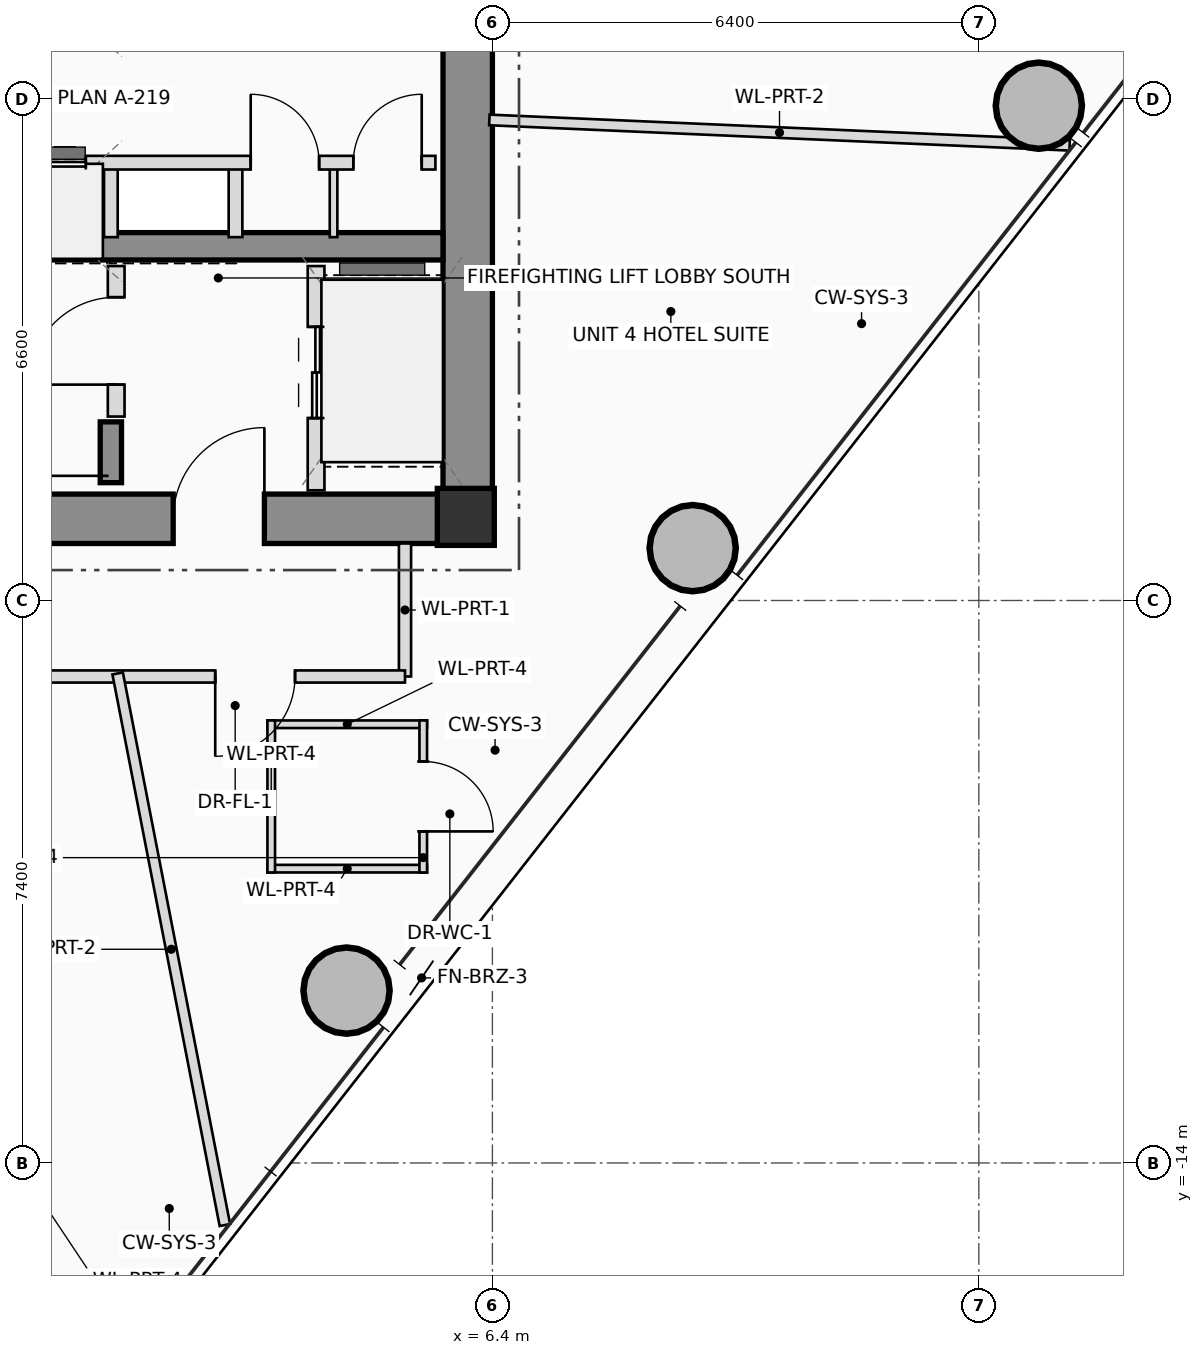
"""IFC4 building model, lengths in metres.
Left out: names, types, materials, properties, quantities, classifications, styles, units other than length and angle.
Written with IfcOpenShell. Run it as: python <this file> out.ifc"""

import sys

from ifc_helpers import new_model, si_unit, direction, frame, frame_2d, origin, origin_2d, place, context, subcontext, project, spatial, rectangle, hollow_circle, extrude, source, transform, mapped, element, fill, save


model = new_model("IFC4")
c1 = context("Model", 3, precision=1e-05, world=origin(), true_north=direction((0.0, 1.0)))
c2 = subcontext(c1, "Body", "Model", "MODEL_VIEW")
j1 = project(units=[si_unit("LENGTHUNIT", "METRE"), si_unit("PLANEANGLEUNIT", "RADIAN")], contexts=[c1])
p1 = place(None, origin())
s1 = spatial("IfcSite", under=j1, at=p1, CompositionType="ELEMENT")
p2 = place(p1, origin())
s2 = spatial("IfcBuilding", under=s1, at=p2, CompositionType="ELEMENT")
p3 = place(p2, frame((0.0, 0.0, 212.15)))
s3 = spatial("IfcBuildingStorey", under=s2, at=p3, CompositionType="ELEMENT", Elevation=212.15)
m1 = source(origin(), c2, "Body", "SweptSolid", [
    extrude(rectangle(XDim=0.75, YDim=0.75, at=origin_2d()), origin(), (0.0, 0.0, 1.0), 3.45),
])
p4 = place(p3, frame((6.05, -5.5, 0.0), z_axis=(0.0, 0.0, 1.0), x_axis=(1.0, 0.0, 0.0)))
e1 = element("IfcColumn", 1, at=p4, inside=s3, PredefinedType="COLUMN", context=c2, shape_type="MappedRepresentation", body=[
    mapped(m1, transform((0.0, 0.0, 0.0), scale=1.0)),
])
p5 = place(p3, frame((-6.4, -5.525, 0.0), z_axis=(0.0, 0.0, 1.0), x_axis=(1.0, 0.0, 0.0)))
e2 = element("IfcWall", 2, at=p5, inside=s3, PredefinedType="SHEAR", context=c2, shape_type="SweptSolid", body=[
    extrude(rectangle(XDim=12.8, YDim=0.65, at=frame_2d((6.4, 0.0))), origin(), (0.0, 0.0, 1.0), 3.45),
])
p6 = place(p5, frame((8.6, 0.0, 0.0)))
e3 = element("IfcOpeningElement", 3, at=p6, cuts=e2, PredefinedType="OPENING", context=c2, shape_type="SweptSolid", body=[
    extrude(rectangle(XDim=1.2, YDim=2.2, at=frame_2d((0.6, 1.1))), frame((0.0, 0.335, 0.0), z_axis=(0.0, -1.0, 0.0), x_axis=(1.0, 0.0, 0.0)), (0.0, 0.0, 1.0), 0.67),
])
p7 = place(p3, frame((6.075, -5.2, 0.0), z_axis=(0.0, 0.0, 1.0), x_axis=(0.0, 1.0, 0.0)))
e4 = element("IfcWall", 4, at=p7, inside=s3, PredefinedType="SHEAR", context=c2, shape_type="SweptSolid", body=[
    extrude(rectangle(XDim=10.4, YDim=0.65, at=frame_2d((5.2, 0.0))), origin(), (0.0, 0.0, 1.0), 3.45),
])
p8 = place(p3, frame((-5.75, -1.94, 0.0), z_axis=(0.0, 0.0, 1.0), x_axis=(1.0, 0.0, 0.0)))
e5 = element("IfcWall", 5, at=p8, inside=s3, PredefinedType="SHEAR", context=c2, shape_type="SweptSolid", body=[
    extrude(rectangle(XDim=11.5, YDim=0.36, at=frame_2d((5.75, 0.0))), origin(), (0.0, 0.0, 1.0), 3.45),
])
p9 = place(p3, frame((1.38, -5.05, 0.0), z_axis=(0.0, 0.0, 1.0), x_axis=(0.0, 1.0, 0.0)))
e6 = element("IfcWall", 6, at=p9, inside=s3, PredefinedType="SHEAR", context=c2, shape_type="SweptSolid", body=[
    extrude(rectangle(XDim=0.8, YDim=0.28, at=frame_2d((0.4, 0.0))), origin(), (0.0, 0.0, 1.0), 3.45),
])
m2 = source(origin(), c2, "Body", "SweptSolid", [
    extrude(hollow_circle(Radius=0.575, WallThickness=0.042, at=origin_2d()), origin(), (0.0, 0.0, 1.0), 3.45),
])
for number, where, z_axis, x_axis in (
    (7, (4.481, -11.732, 0.0), (0.0, 0.0, 1.0), (1.0, 0.0, 0.0)),
    (8, (9.035, -5.911, 0.0), (0.0, 0.0, 1.0), (1.0, 0.0, 0.0)),
    (9, (13.59, -0.09, 0.0), (0.0, 0.0, 1.0), (1.0, 0.0, 0.0)),
):
    element("IfcColumn", number, at=place(p3, frame(where, z_axis=z_axis, x_axis=x_axis)), inside=s3, PredefinedType="COLUMN", context=c2, shape_type="MappedRepresentation", body=[
        mapped(m2, transform((0.0, 0.0, 0.0), scale=1.0)),
    ])
p10 = place(p3, frame((1.45, -4.18, 0.0), z_axis=(0.0, 0.0, 1.0), x_axis=(0.0, 1.0, 0.0)))
e10 = element("IfcWall", 10, at=p10, inside=s3, PredefinedType="PLUMBINGWALL", context=c2, shape_type="SweptSolid", body=[
    extrude(rectangle(XDim=1.98, YDim=0.22, at=frame_2d((0.99, 0.0))), origin(), (0.0, 0.0, 1.0), 3.25),
])
p11 = place(p10, frame((0.42, 0.0, 0.0)))
e11 = element("IfcOpeningElement", 11, at=p11, cuts=e10, PredefinedType="OPENING", context=c2, shape_type="SweptSolid", body=[
    extrude(rectangle(XDim=1.15, YDim=2.15, at=frame_2d((0.575, 1.075))), frame((0.0, 0.12, 0.0), z_axis=(0.0, -1.0, 0.0), x_axis=(1.0, 0.0, 0.0)), (0.0, 0.0, 1.0), 0.24),
])
p12 = place(p3, frame((4.08, -5.15, 0.0), z_axis=(0.0, 0.0, 1.0), x_axis=(0.0, 1.0, 0.0)))
e12 = element("IfcWall", 12, at=p12, inside=s3, PredefinedType="PLUMBINGWALL", context=c2, shape_type="SweptSolid", body=[
    extrude(rectangle(XDim=2.95, YDim=0.22, at=frame_2d((1.475, 0.0))), origin(), (0.0, 0.0, 1.0), 3.25),
])
p13 = place(p12, frame((0.95, 0.0, 0.0)))
e13 = element("IfcOpeningElement", 13, at=p13, cuts=e12, PredefinedType="OPENING", context=c2, shape_type="SweptSolid", body=[
    extrude(rectangle(XDim=1.2, YDim=2.25, at=frame_2d((0.6, 1.125))), frame((0.0, 0.12, 0.0), z_axis=(0.0, -1.0, 0.0), x_axis=(1.0, 0.0, 0.0)), (0.0, 0.0, 1.0), 0.24),
])
for number, where, z_axis, x_axis in (
    (14, (1.38, -1.82, 0.0), (0.0, 0.0, 1.0), (0.0, 1.0, 0.0)),
    (15, (3.02, -1.82, 0.0), (0.0, 0.0, 1.0), (0.0, 1.0, 0.0)),
):
    element("IfcWall", number, at=place(p3, frame(where, z_axis=z_axis, x_axis=x_axis)), inside=s3, PredefinedType="PLUMBINGWALL", context=c2, shape_type="SweptSolid", body=[
        extrude(rectangle(XDim=0.98, YDim=0.18, at=frame_2d((0.49, 0.0))), origin(), (0.0, 0.0, 1.0), 3.25),
    ])
p14 = place(p3, frame((4.31, -1.82, 0.0), z_axis=(0.0, 0.0, 1.0), x_axis=(0.0, 1.0, 0.0)))
e16 = element("IfcWall", 16, at=p14, inside=s3, PredefinedType="PARTITIONING", context=c2, shape_type="SweptSolid", body=[
    extrude(rectangle(XDim=0.98, YDim=0.1, at=frame_2d((0.49, 0.0))), origin(), (0.0, 0.0, 1.0), 3.25),
])
p15 = place(p3, frame((-5.68, -0.84, 0.0), z_axis=(0.0, 0.0, 1.0), x_axis=(1.0, 0.0, 0.0)))
e17 = element("IfcWall", 17, at=p15, inside=s3, PredefinedType="PLUMBINGWALL", context=c2, shape_type="SweptSolid", body=[
    extrude(rectangle(XDim=11.33, YDim=0.18, at=frame_2d((5.665, 0.0))), origin(), (0.0, 0.0, 1.0), 3.25),
])
p16 = place(p15, frame((1.18, 0.0, 0.0)))
e18 = element("IfcOpeningElement", 18, at=p16, cuts=e17, PredefinedType="OPENING", context=c2, shape_type="SweptSolid", body=[
    extrude(rectangle(XDim=0.9, YDim=2.05, at=frame_2d((0.45, 1.025))), frame((0.0, 0.1, 0.0), z_axis=(0.0, -1.0, 0.0), x_axis=(1.0, 0.0, 0.0)), (0.0, 0.0, 1.0), 0.2),
])
p17 = place(p15, frame((3.93, 0.0, 0.0)))
e19 = element("IfcOpeningElement", 19, at=p17, cuts=e17, PredefinedType="OPENING", context=c2, shape_type="SweptSolid", body=[
    extrude(rectangle(XDim=1.1, YDim=2.2, at=frame_2d((0.55, 1.1))), frame((0.0, 0.1, 0.0), z_axis=(0.0, -1.0, 0.0), x_axis=(1.0, 0.0, 0.0)), (0.0, 0.0, 1.0), 0.2),
])
p18 = place(p15, frame((5.63, 0.0, 0.0)))
e20 = element("IfcOpeningElement", 20, at=p18, cuts=e17, PredefinedType="OPENING", context=c2, shape_type="SweptSolid", body=[
    extrude(rectangle(XDim=1.1, YDim=2.2, at=frame_2d((0.55, 1.1))), frame((0.0, 0.1, 0.0), z_axis=(0.0, -1.0, 0.0), x_axis=(1.0, 0.0, 0.0)), (0.0, 0.0, 1.0), 0.2),
])
p19 = place(p15, frame((8.9, 0.0, 0.0)))
e21 = element("IfcOpeningElement", 21, at=p19, cuts=e17, PredefinedType="OPENING", context=c2, shape_type="SweptSolid", body=[
    extrude(rectangle(XDim=0.9, YDim=2.05, at=frame_2d((0.45, 1.025))), frame((0.0, 0.1, 0.0), z_axis=(0.0, -1.0, 0.0), x_axis=(1.0, 0.0, 0.0)), (0.0, 0.0, 1.0), 0.2),
])
p20 = place(p15, frame((10.25, 0.0, 0.0)))
e22 = element("IfcOpeningElement", 22, at=p20, cuts=e17, PredefinedType="OPENING", context=c2, shape_type="SweptSolid", body=[
    extrude(rectangle(XDim=0.9, YDim=2.05, at=frame_2d((0.45, 1.025))), frame((0.0, 0.1, 0.0), z_axis=(0.0, -1.0, 0.0), x_axis=(1.0, 0.0, 0.0)), (0.0, 0.0, 1.0), 0.2),
])
for number, where, z_axis, x_axis in (
    (23, (3.44, -8.228, 0.0), (0.0, 0.0, 1.0), (1.0, 0.0, 0.0)),
    (24, (5.54, -10.128, 0.0), (0.0, 0.0, 1.0), (-1.0, 0.0, 0.0)),
):
    element("IfcWall", number, at=place(p3, frame(where, z_axis=z_axis, x_axis=x_axis)), inside=s3, PredefinedType="PARTITIONING", context=c2, shape_type="SweptSolid", body=[
        extrude(rectangle(XDim=2.1, YDim=0.1, at=frame_2d((1.05, 0.0))), origin(), (0.0, 0.0, 1.0), 2.605),
    ])
p21 = place(p3, frame((5.49, -8.178, 0.0), z_axis=(0.0, 0.0, 1.0), x_axis=(0.0, -1.0, 0.0)))
e25 = element("IfcWall", 25, at=p21, inside=s3, PredefinedType="PARTITIONING", context=c2, shape_type="SweptSolid", body=[
    extrude(rectangle(XDim=2.0, YDim=0.1, at=frame_2d((1.0, 0.0))), origin(), (0.0, 0.0, 1.0), 2.605),
])
p22 = place(p21, frame((0.54, 0.0, 0.0)))
e26 = element("IfcOpeningElement", 26, at=p22, cuts=e25, PredefinedType="OPENING", context=c2, shape_type="SweptSolid", body=[
    extrude(rectangle(XDim=0.92, YDim=2.1, at=frame_2d((0.46, 1.05))), frame((0.0, 0.06, 0.0), z_axis=(0.0, -1.0, 0.0), x_axis=(1.0, 0.0, 0.0)), (0.0, 0.0, 1.0), 0.12),
])
p23 = place(p3, frame((3.49, -10.178, 0.0), z_axis=(0.0, 0.0, 1.0), x_axis=(0.0, 1.0, 0.0)))
e27 = element("IfcWall", 27, at=p23, inside=s3, PredefinedType="PARTITIONING", context=c2, shape_type="SweptSolid", body=[
    extrude(rectangle(XDim=2.0, YDim=0.1, at=frame_2d((1.0, 0.0))), origin(), (0.0, 0.0, 1.0), 2.805),
])
p24 = place(p3, frame((5.25, -5.85, 0.0), z_axis=(0.0, 0.0, 1.0), x_axis=(0.0, -1.0, 0.0)))
e28 = element("IfcWall", 28, at=p24, inside=s3, PredefinedType="PARTITIONING", context=c2, shape_type="SweptSolid", body=[
    extrude(rectangle(XDim=1.75, YDim=0.16, at=frame_2d((0.875, 0.0))), origin(), (0.0, 0.0, 1.0), 3.25),
])
p25 = place(p3, frame((5.25, -7.6, 0.0), z_axis=(0.0, 0.0, 1.0), x_axis=(-1.0, 0.0, 0.0)))
e29 = element("IfcWall", 29, at=p25, inside=s3, PredefinedType="PARTITIONING", context=c2, shape_type="SweptSolid", body=[
    extrude(rectangle(XDim=11.61, YDim=0.16, at=frame_2d((5.805, 0.0))), origin(), (0.0, 0.0, 1.0), 2.605),
])
p26 = place(p25, frame((1.447, 0.0, 0.0)))
e30 = element("IfcOpeningElement", 30, at=p26, cuts=e29, PredefinedType="OPENING", context=c2, shape_type="SweptSolid", body=[
    extrude(rectangle(XDim=1.05, YDim=2.2, at=frame_2d((0.525, 1.1))), frame((0.0, 0.09, 0.0), z_axis=(0.0, -1.0, 0.0), x_axis=(1.0, 0.0, 0.0)), (0.0, 0.0, 1.0), 0.18),
])
p27 = place(p25, frame((4.912, 0.0, 0.0)))
e31 = element("IfcOpeningElement", 31, at=p27, cuts=e29, PredefinedType="OPENING", context=c2, shape_type="SweptSolid", body=[
    extrude(rectangle(XDim=1.05, YDim=2.2, at=frame_2d((0.525, 1.1))), frame((0.0, 0.09, 0.0), z_axis=(0.0, -1.0, 0.0), x_axis=(1.0, 0.0, 0.0)), (0.0, 0.0, 1.0), 0.18),
])
p28 = place(p3, frame((6.36, -0.278, 0.0), z_axis=(0.0, 0.0, 1.0), x_axis=(0.999047276506, -0.04364102778, 0.0)))
e32 = element("IfcWall", 32, at=p28, inside=s3, PredefinedType="PARTITIONING", context=c2, shape_type="SweptSolid", body=[
    extrude(rectangle(XDim=7.642, YDim=0.14, at=frame_2d((3.821, 0.0))), origin(), (0.0, 0.0, 1.0), 2.605),
])
p29 = place(p3, frame((1.469, -7.56, 0.0), z_axis=(0.0, 0.0, 1.0), x_axis=(0.190822808967, -0.981624498257, 0.0)))
e33 = element("IfcWall", 33, at=p29, inside=s3, PredefinedType="PARTITIONING", context=c2, shape_type="SweptSolid", body=[
    extrude(rectangle(XDim=7.392, YDim=0.14, at=frame_2d((3.696, 0.0))), origin(), (0.0, 0.0, 1.0), 2.765),
])
p30 = place(p6, origin())
e34 = element("IfcDoor", 34, at=p30, inside=s3, OperationType="SINGLE_SWING_RIGHT", PredefinedType="DOOR", context=c2, shape_type="SweptSolid", body=[
    extrude(rectangle(XDim=1.2, YDim=2.2, at=frame_2d((0.6, 1.1))), frame((0.0, 0.025, 0.0), z_axis=(0.0, -1.0, 0.0), x_axis=(1.0, 0.0, 0.0)), (0.0, 0.0, 1.0), 0.05),
])
fill(e3, e34)
p31 = place(p11, origin())
e35 = element("IfcDoor", 35, at=p31, inside=s3, OperationType="SINGLE_SWING_LEFT", PredefinedType="DOOR", context=c2, shape_type="SweptSolid", body=[
    extrude(rectangle(XDim=1.15, YDim=2.15, at=frame_2d((0.575, 1.075))), frame((0.0, 0.025, 0.0), z_axis=(0.0, -1.0, 0.0), x_axis=(1.0, 0.0, 0.0)), (0.0, 0.0, 1.0), 0.05),
])
fill(e11, e35)
p32 = place(p13, origin())
e36 = element("IfcDoor", 36, at=p32, inside=s3, OperationType="DOUBLE_DOOR_SLIDING", PredefinedType="DOOR", context=c2, shape_type="SweptSolid", body=[
    extrude(rectangle(XDim=1.2, YDim=2.25, at=frame_2d((0.6, 1.125))), frame((0.0, 0.025, 0.0), z_axis=(0.0, -1.0, 0.0), x_axis=(1.0, 0.0, 0.0)), (0.0, 0.0, 1.0), 0.05),
])
fill(e13, e36)
p33 = place(p18, origin())
e37 = element("IfcDoor", 37, at=p33, inside=s3, OperationType="DOUBLE_DOOR_SLIDING", PredefinedType="DOOR", context=c2, shape_type="SweptSolid", body=[
    extrude(rectangle(XDim=1.1, YDim=2.2, at=frame_2d((0.55, 1.1))), frame((0.0, 0.025, 0.0), z_axis=(0.0, -1.0, 0.0), x_axis=(1.0, 0.0, 0.0)), (0.0, 0.0, 1.0), 0.05),
])
fill(e20, e37)
p34 = place(p19, origin())
e38 = element("IfcDoor", 38, at=p34, inside=s3, OperationType="SINGLE_SWING_LEFT", PredefinedType="DOOR", context=c2, shape_type="SweptSolid", body=[
    extrude(rectangle(XDim=0.9, YDim=2.05, at=frame_2d((0.45, 1.025))), frame((0.0, 0.025, 0.0), z_axis=(0.0, -1.0, 0.0), x_axis=(1.0, 0.0, 0.0)), (0.0, 0.0, 1.0), 0.05),
])
fill(e21, e38)
p35 = place(p20, origin())
e39 = element("IfcDoor", 39, at=p35, inside=s3, OperationType="SINGLE_SWING_RIGHT", PredefinedType="DOOR", context=c2, shape_type="SweptSolid", body=[
    extrude(rectangle(XDim=0.9, YDim=2.05, at=frame_2d((0.45, 1.025))), frame((0.0, 0.025, 0.0), z_axis=(0.0, -1.0, 0.0), x_axis=(1.0, 0.0, 0.0)), (0.0, 0.0, 1.0), 0.05),
])
fill(e22, e39)
p36 = place(p22, origin())
e40 = element("IfcDoor", 40, at=p36, inside=s3, OperationType="SINGLE_SWING_RIGHT", PredefinedType="DOOR", context=c2, shape_type="SweptSolid", body=[
    extrude(rectangle(XDim=0.92, YDim=2.1, at=frame_2d((0.46, 1.05))), frame((0.0, 0.025, 0.0), z_axis=(0.0, -1.0, 0.0), x_axis=(1.0, 0.0, 0.0)), (0.0, 0.0, 1.0), 0.05),
])
fill(e26, e40)
p37 = place(p26, origin())
e41 = element("IfcDoor", 41, at=p37, inside=s3, OperationType="SINGLE_SWING_RIGHT", PredefinedType="DOOR", context=c2, shape_type="SweptSolid", body=[
    extrude(rectangle(XDim=1.05, YDim=2.2, at=frame_2d((0.525, 1.1))), frame((0.0, 0.025, 0.0), z_axis=(0.0, -1.0, 0.0), x_axis=(1.0, 0.0, 0.0)), (0.0, 0.0, 1.0), 0.05),
])
fill(e30, e41)
save(model, sys.argv[1])
